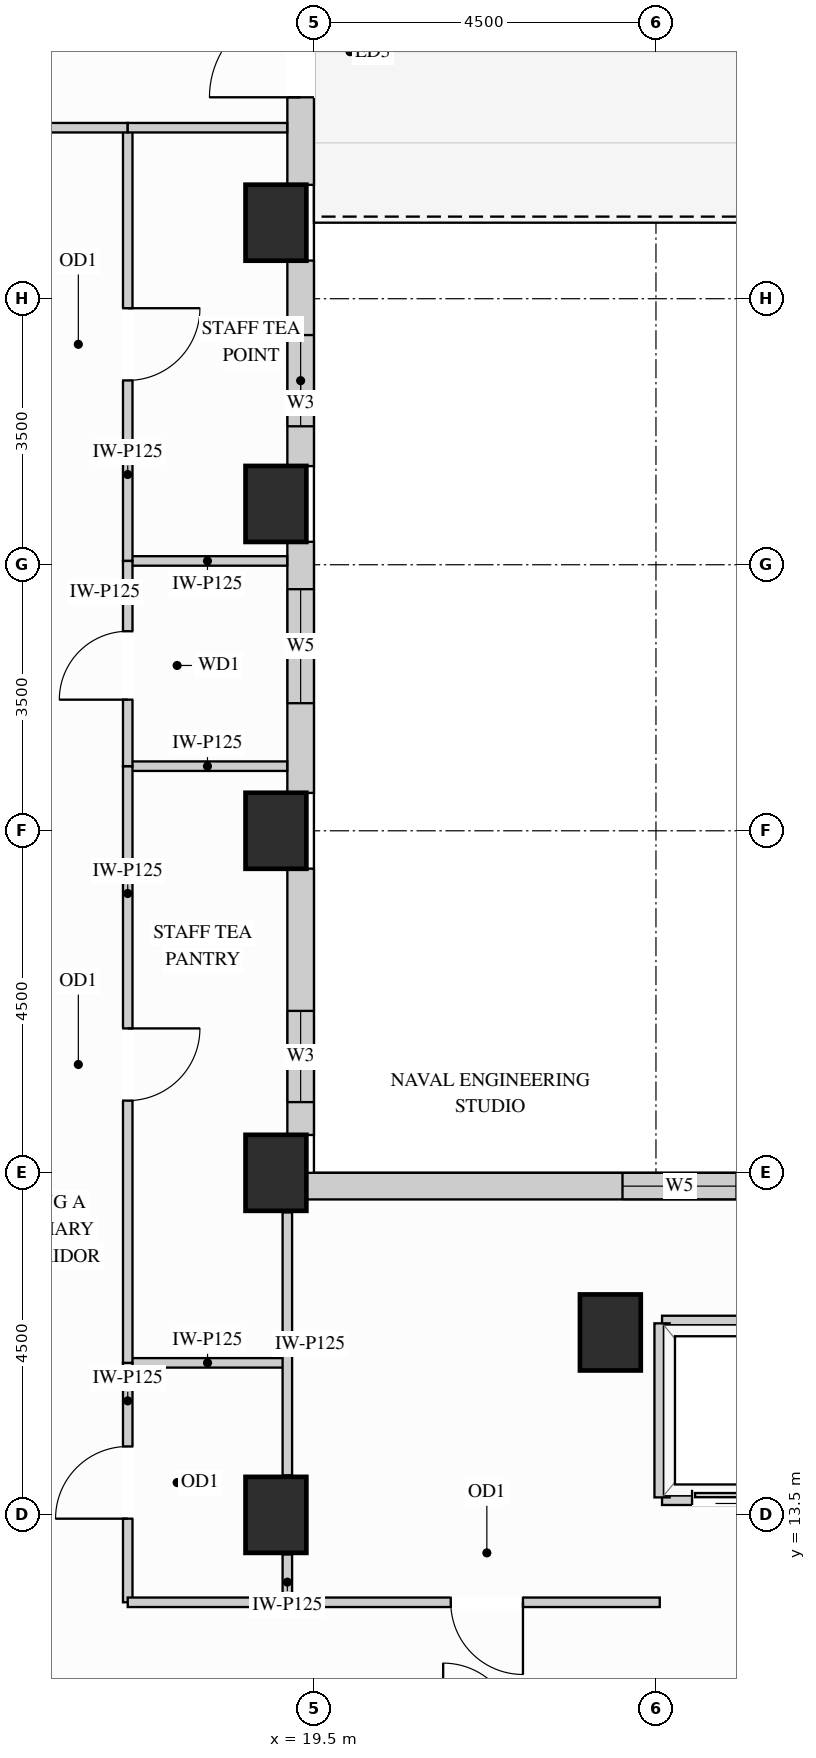
"""IFC4 building model, lengths in metres.
Left out: names, types, materials, properties, quantities, classifications, styles, units other than length and angle.
Written with IfcOpenShell. Run it as: python <this file> out.ifc"""

import sys

from ifc_helpers import new_model, si_unit, direction, frame, frame_2d, origin, origin_2d, place, context, subcontext, project, spatial, rectangle, extrude, source, transform, mapped, element, fill, save


model = new_model("IFC4")
c1 = context("Model", 3, precision=1e-05, world=origin(), true_north=direction((0.0, 1.0)))
c2 = subcontext(c1, "Body", "Model", "MODEL_VIEW")
j1 = project(units=[si_unit("LENGTHUNIT", "METRE"), si_unit("PLANEANGLEUNIT", "RADIAN")], contexts=[c1])
p1 = place(None, origin())
s1 = spatial("IfcSite", under=j1, at=p1, CompositionType="ELEMENT")
p2 = place(p1, origin())
s2 = spatial("IfcBuilding", under=s1, at=p2, CompositionType="ELEMENT")
p3 = place(p2, frame((0.0, 0.0, 200.7)))
s3 = spatial("IfcBuildingStorey", under=s2, at=p3, CompositionType="ELEMENT", Elevation=200.7)
m1 = source(origin(), c2, "Body", "SweptSolid", [
    extrude(rectangle(XDim=0.8, YDim=1.0, at=origin_2d()), origin(), (0.0, 0.0, 1.0), 3.4),
])
for number, where, z_axis, x_axis in (
    (1, (19.0, 13.5, 0.0), (0.0, 0.0, 1.0), (1.0, 0.0, 0.0)),
    (2, (19.0, 18.0, 0.0), (0.0, 0.0, 1.0), (1.0, 0.0, 0.0)),
    (3, (19.0, 22.5, 0.0), (0.0, 0.0, 1.0), (1.0, 0.0, 0.0)),
    (4, (19.0, 26.8, 0.0), (0.0, 0.0, 1.0), (1.0, 0.0, 0.0)),
    (5, (19.0, 30.5, 0.0), (0.0, 0.0, 1.0), (1.0, 0.0, 0.0)),
    (6, (23.4, 15.9, 0.0), (0.0, 0.0, 1.0), (1.0, 0.0, 0.0)),
):
    element("IfcColumn", number, at=place(p3, frame(where, z_axis=z_axis, x_axis=x_axis)), inside=s3, PredefinedType="COLUMN", context=c2, shape_type="MappedRepresentation", body=[
        mapped(m1, transform((0.0, 0.0, 0.0), x_axis=(1.0, 0.0, 0.0), y_axis=(0.0, 1.0, 0.0), z_axis=(0.0, 0.0, 1.0))),
    ])
p4 = place(p3, frame((34.502, 17.825, 0.0), z_axis=(0.0, 0.0, 1.0), x_axis=(-1.0, 0.0, 0.0)))
e7 = element("IfcWall", 7, at=p4, inside=s3, PredefinedType="SOLIDWALL", context=c2, shape_type="SweptSolid", body=[
    extrude(rectangle(XDim=15.104, YDim=0.35, at=frame_2d((7.552, 0.0))), origin(), (0.0, 0.0, 1.0), 3.385),
])
p5 = place(p4, frame((4.131, 0.0, 0.78)))
e8 = element("IfcOpeningElement", 8, at=p5, cuts=e7, PredefinedType="OPENING", context=c2, shape_type="SweptSolid", body=[
    extrude(rectangle(XDim=1.5, YDim=2.0, at=frame_2d((0.75, 1.0))), frame((0.0, 0.185, 0.0), z_axis=(0.0, -1.0, 0.0), x_axis=(1.0, 0.0, 0.0)), (0.0, 0.0, 1.0), 0.37),
])
p6 = place(p4, frame((9.442, 0.0, 0.78)))
e9 = element("IfcOpeningElement", 9, at=p6, cuts=e7, PredefinedType="OPENING", context=c2, shape_type="SweptSolid", body=[
    extrude(rectangle(XDim=1.5, YDim=2.0, at=frame_2d((0.75, 1.0))), frame((0.0, 0.185, 0.0), z_axis=(0.0, -1.0, 0.0), x_axis=(1.0, 0.0, 0.0)), (0.0, 0.0, 1.0), 0.37),
])
p7 = place(p3, frame((19.325, 18.498, 0.0), z_axis=(0.0, 0.0, 1.0), x_axis=(0.0, 1.0, 0.0)))
e10 = element("IfcWall", 10, at=p7, inside=s3, PredefinedType="SOLIDWALL", context=c2, shape_type="SweptSolid", body=[
    extrude(rectangle(XDim=3.504, YDim=0.35, at=frame_2d((1.752, 0.0))), origin(), (0.0, 0.0, 1.0), 2.612),
])
p8 = place(p7, frame((0.433, 0.0, 0.78)))
e11 = element("IfcOpeningElement", 11, at=p8, cuts=e10, PredefinedType="OPENING", context=c2, shape_type="SweptSolid", body=[
    extrude(rectangle(XDim=1.2, YDim=1.652, at=frame_2d((0.6, 0.826))), frame((0.0, 0.185, 0.0), z_axis=(0.0, -1.0, 0.0), x_axis=(1.0, 0.0, 0.0)), (0.0, 0.0, 1.0), 0.37),
])
p9 = place(p3, frame((19.325, 22.998, 0.0), z_axis=(0.0, 0.0, 1.0), x_axis=(0.0, 1.0, 0.0)))
e12 = element("IfcWall", 12, at=p9, inside=s3, PredefinedType="SOLIDWALL", context=c2, shape_type="SweptSolid", body=[
    extrude(rectangle(XDim=3.304, YDim=0.35, at=frame_2d((1.652, 0.0))), origin(), (0.0, 0.0, 1.0), 2.612),
])
p10 = place(p9, frame((1.18, 0.0, 0.78)))
e13 = element("IfcOpeningElement", 13, at=p10, cuts=e12, PredefinedType="OPENING", context=c2, shape_type="SweptSolid", body=[
    extrude(rectangle(XDim=1.5, YDim=1.652, at=frame_2d((0.75, 0.826))), frame((0.0, 0.185, 0.0), z_axis=(0.0, -1.0, 0.0), x_axis=(1.0, 0.0, 0.0)), (0.0, 0.0, 1.0), 0.37),
])
p11 = place(p3, frame((19.325, 27.298, 0.0), z_axis=(0.0, 0.0, 1.0), x_axis=(0.0, 1.0, 0.0)))
e14 = element("IfcWall", 14, at=p11, inside=s3, PredefinedType="SOLIDWALL", context=c2, shape_type="SweptSolid", body=[
    extrude(rectangle(XDim=2.704, YDim=0.35, at=frame_2d((1.352, 0.0))), origin(), (0.0, 0.0, 1.0), 2.612),
])
p12 = place(p11, frame((0.524, 0.0, 0.78)))
e15 = element("IfcOpeningElement", 15, at=p12, cuts=e14, PredefinedType="OPENING", context=c2, shape_type="SweptSolid", body=[
    extrude(rectangle(XDim=1.2, YDim=1.652, at=frame_2d((0.6, 0.826))), frame((0.0, 0.185, 0.0), z_axis=(0.0, -1.0, 0.0), x_axis=(1.0, 0.0, 0.0)), (0.0, 0.0, 1.0), 0.37),
])
p13 = place(p3, frame((19.325, 30.998, 0.0), z_axis=(0.0, 0.0, 1.0), x_axis=(0.0, 1.0, 0.0)))
e16 = element("IfcWall", 16, at=p13, inside=s3, PredefinedType="SOLIDWALL", context=c2, shape_type="SweptSolid", body=[
    extrude(rectangle(XDim=3.504, YDim=0.35, at=frame_2d((1.752, 0.0))), origin(), (0.0, 0.0, 1.0), 2.612),
])
p14 = place(p13, frame((1.152, 0.0, 0.0)))
e17 = element("IfcOpeningElement", 17, at=p14, cuts=e16, PredefinedType="OPENING", context=c2, shape_type="SweptSolid", body=[
    extrude(rectangle(XDim=1.2, YDim=2.15, at=frame_2d((0.6, 1.075))), frame((0.0, 0.185, 0.0), z_axis=(0.0, -1.0, 0.0), x_axis=(1.0, 0.0, 0.0)), (0.0, 0.0, 1.0), 0.37),
])
m2 = source(origin(), c2, "Body", "SweptSolid", [
    extrude(rectangle(XDim=2.1, YDim=0.125, at=frame_2d((1.05, 0.0))), origin(), (0.0, 0.0, 1.0), 3.385),
])
p15 = place(p3, frame((17.05, 15.5, 0.0), z_axis=(0.0, 0.0, 1.0), x_axis=(1.0, 0.0, 0.0)))
e18 = element("IfcWall", 18, at=p15, inside=s3, PredefinedType="PARTITIONING", context=c2, shape_type="MappedRepresentation", body=[
    mapped(m2, transform((0.0, 0.0, 0.0), x_axis=(1.0, 0.0, 0.0), y_axis=(0.0, 1.0, 0.0), z_axis=(0.0, 0.0, 1.0))),
])
m3 = source(origin(), c2, "Body", "SweptSolid", [
    extrude(rectangle(XDim=2.098, YDim=0.125, at=frame_2d((1.049, 0.0))), origin(), (0.0, 0.0, 1.0), 3.385),
])
for number, where, z_axis, x_axis in (
    (19, (17.05, 23.35, 0.0), (0.0, 0.0, 1.0), (1.0, 0.0, 0.0)),
    (20, (17.05, 26.05, 0.0), (0.0, 0.0, 1.0), (1.0, 0.0, 0.0)),
):
    element("IfcWall", number, at=place(p3, frame(where, z_axis=z_axis, x_axis=x_axis)), inside=s3, PredefinedType="PARTITIONING", context=c2, shape_type="MappedRepresentation", body=[
        mapped(m3, transform((0.0, 0.0, 0.0), x_axis=(1.0, 0.0, 0.0), y_axis=(0.0, 1.0, 0.0), z_axis=(0.0, 0.0, 1.0))),
    ])
m4 = source(origin(), c2, "Body", "SweptSolid", [
    extrude(rectangle(XDim=0.63, YDim=0.125, at=frame_2d((0.315, 0.0))), origin(), (0.0, 0.0, 1.0), 2.773),
])
p16 = place(p3, frame((19.15, 12.35, 0.0), z_axis=(0.0, 0.0, 1.0), x_axis=(0.0, 1.0, 0.0)))
e21 = element("IfcWall", 21, at=p16, inside=s3, PredefinedType="PARTITIONING", context=c2, shape_type="MappedRepresentation", body=[
    mapped(m4, transform((0.0, 0.0, 0.0), x_axis=(1.0, 0.0, 0.0), y_axis=(0.0, 1.0, 0.0), z_axis=(0.0, 0.0, 1.0))),
])
m5 = source(origin(), c2, "Body", "SweptSolid", [
    extrude(rectangle(XDim=3.46, YDim=0.125, at=frame_2d((1.73, 0.0))), origin(), (0.0, 0.0, 1.0), 2.773),
])
p17 = place(p3, frame((19.15, 14.02, 0.0), z_axis=(0.0, 0.0, 1.0), x_axis=(0.0, 1.0, 0.0)))
e22 = element("IfcWall", 22, at=p17, inside=s3, PredefinedType="PARTITIONING", context=c2, shape_type="MappedRepresentation", body=[
    mapped(m5, transform((0.0, 0.0, 0.0), x_axis=(1.0, 0.0, 0.0), y_axis=(0.0, 1.0, 0.0), z_axis=(0.0, 0.0, 1.0))),
])
p18 = place(p3, frame((17.05, 12.35, 0.0), z_axis=(0.0, 0.0, 1.0), x_axis=(0.0, 1.0, 0.0)))
e23 = element("IfcWall", 23, at=p18, inside=s3, PredefinedType="PARTITIONING", context=c2, shape_type="SweptSolid", body=[
    extrude(rectangle(XDim=3.15, YDim=0.125, at=frame_2d((1.575, 0.0))), origin(), (0.0, 0.0, 1.0), 3.385),
])
p19 = place(p18, frame((1.1, 0.0, 0.0)))
e24 = element("IfcOpeningElement", 24, at=p19, cuts=e23, PredefinedType="OPENING", context=c2, shape_type="SweptSolid", body=[
    extrude(rectangle(XDim=0.95, YDim=2.15, at=frame_2d((0.475, 1.075))), frame((0.0, 0.073, 0.0), z_axis=(0.0, -1.0, 0.0), x_axis=(1.0, 0.0, 0.0)), (0.0, 0.0, 1.0), 0.145),
])
p20 = place(p3, frame((17.05, 15.5, 0.0), z_axis=(0.0, 0.0, 1.0), x_axis=(0.0, 1.0, 0.0)))
e25 = element("IfcWall", 25, at=p20, inside=s3, PredefinedType="PARTITIONING", context=c2, shape_type="SweptSolid", body=[
    extrude(rectangle(XDim=7.85, YDim=0.125, at=frame_2d((3.925, 0.0))), origin(), (0.0, 0.0, 1.0), 3.385),
])
p21 = place(p20, frame((3.45, 0.0, 0.0)))
e26 = element("IfcOpeningElement", 26, at=p21, cuts=e25, PredefinedType="OPENING", context=c2, shape_type="SweptSolid", body=[
    extrude(rectangle(XDim=0.95, YDim=2.15, at=frame_2d((0.475, 1.075))), frame((0.0, 0.073, 0.0), z_axis=(0.0, -1.0, 0.0), x_axis=(1.0, 0.0, 0.0)), (0.0, 0.0, 1.0), 0.145),
])
p22 = place(p3, frame((17.05, 26.05, 0.0), z_axis=(0.0, 0.0, 1.0), x_axis=(0.0, 1.0, 0.0)))
e27 = element("IfcWall", 27, at=p22, inside=s3, PredefinedType="PARTITIONING", context=c2, shape_type="SweptSolid", body=[
    extrude(rectangle(XDim=5.7, YDim=0.125, at=frame_2d((2.85, 0.0))), origin(), (0.0, 0.0, 1.0), 3.385),
])
p23 = place(p22, frame((2.375, 0.0, 0.0)))
e28 = element("IfcOpeningElement", 28, at=p23, cuts=e27, PredefinedType="OPENING", context=c2, shape_type="SweptSolid", body=[
    extrude(rectangle(XDim=0.95, YDim=2.15, at=frame_2d((0.475, 1.075))), frame((0.0, 0.073, 0.0), z_axis=(0.0, -1.0, 0.0), x_axis=(1.0, 0.0, 0.0)), (0.0, 0.0, 1.0), 0.145),
])
p24 = place(p3, frame((17.05, 23.35, 0.0), z_axis=(0.0, 0.0, 1.0), x_axis=(0.0, 1.0, 0.0)))
e29 = element("IfcWall", 29, at=p24, inside=s3, PredefinedType="PARTITIONING", context=c2, shape_type="SweptSolid", body=[
    extrude(rectangle(XDim=2.7, YDim=0.125, at=frame_2d((1.35, 0.0))), origin(), (0.0, 0.0, 1.0), 3.385),
])
p25 = place(p24, frame((0.875, 0.0, 0.0)))
e30 = element("IfcOpeningElement", 30, at=p25, cuts=e29, PredefinedType="OPENING", context=c2, shape_type="SweptSolid", body=[
    extrude(rectangle(XDim=0.9, YDim=2.15, at=frame_2d((0.45, 1.075))), frame((0.0, 0.073, 0.0), z_axis=(0.0, -1.0, 0.0), x_axis=(1.0, 0.0, 0.0)), (0.0, 0.0, 1.0), 0.145),
])
p26 = place(p3, frame((11.916, 31.75, 0.0), z_axis=(0.0, 0.0, 1.0), x_axis=(1.0, 0.0, 0.0)))
e31 = element("IfcWall", 31, at=p26, inside=s3, PredefinedType="PARTITIONING", context=c2, shape_type="SweptSolid", body=[
    extrude(rectangle(XDim=5.134, YDim=0.125, at=frame_2d((2.567, 0.0))), origin(), (0.0, 0.0, 1.0), 2.848),
])
p27 = place(p26, frame((2.092, 0.0, 0.0)))
e32 = element("IfcOpeningElement", 32, at=p27, cuts=e31, PredefinedType="OPENING", context=c2, shape_type="SweptSolid", body=[
    extrude(rectangle(XDim=0.95, YDim=2.15, at=frame_2d((0.475, 1.075))), frame((0.0, 0.073, 0.0), z_axis=(0.0, -1.0, 0.0), x_axis=(1.0, 0.0, 0.0)), (0.0, 0.0, 1.0), 0.145),
])
m6 = source(origin(), c2, "Body", "SweptSolid", [
    extrude(rectangle(XDim=2.098, YDim=0.125, at=frame_2d((1.049, 0.0))), origin(), (0.0, 0.0, 1.0), 2.848),
])
p28 = place(p3, frame((17.05, 31.75, 0.0), z_axis=(0.0, 0.0, 1.0), x_axis=(1.0, 0.0, 0.0)))
e33 = element("IfcWall", 33, at=p28, inside=s3, PredefinedType="PARTITIONING", context=c2, shape_type="MappedRepresentation", body=[
    mapped(m6, transform((0.0, 0.0, 0.0), x_axis=(1.0, 0.0, 0.0), y_axis=(0.0, 1.0, 0.0), z_axis=(0.0, 0.0, 1.0))),
])
m7 = source(origin(), c2, "Body", "SweptSolid", [
    extrude(rectangle(XDim=2.45, YDim=0.125, at=frame_2d((1.225, 0.0))), origin(), (0.0, 0.0, 1.0), 3.385),
])
p29 = place(p3, frame((17.05, 12.35, 0.0), z_axis=(0.0, 0.0, 1.0), x_axis=(1.0, 0.0, 0.0)))
e34 = element("IfcWall", 34, at=p29, inside=s3, PredefinedType="PARTITIONING", context=c2, shape_type="MappedRepresentation", body=[
    mapped(m7, transform((0.0, 0.0, 0.0), x_axis=(1.0, 0.0, 0.0), y_axis=(0.0, 1.0, 0.0), z_axis=(0.0, 0.0, 1.0))),
])
p30 = place(p3, frame((19.5, 12.35, 0.0), z_axis=(0.0, 0.0, 1.0), x_axis=(1.0, 0.0, 0.0)))
e35 = element("IfcWall", 35, at=p30, inside=s3, PredefinedType="PARTITIONING", context=c2, shape_type="SweptSolid", body=[
    extrude(rectangle(XDim=4.55, YDim=0.125, at=frame_2d((2.275, 0.0))), origin(), (0.0, 0.0, 1.0), 3.385),
])
p31 = place(p30, frame((1.8, 0.0, 0.0)))
e36 = element("IfcOpeningElement", 36, at=p31, cuts=e35, PredefinedType="OPENING", context=c2, shape_type="SweptSolid", body=[
    extrude(rectangle(XDim=0.95, YDim=2.15, at=frame_2d((0.475, 1.075))), frame((0.0, 0.073, 0.0), z_axis=(0.0, -1.0, 0.0), x_axis=(1.0, 0.0, 0.0)), (0.0, 0.0, 1.0), 0.145),
])
m8 = source(origin(), c2, "Body", "SweptSolid", [
    extrude(rectangle(XDim=1.89, YDim=0.2, at=frame_2d((0.945, 0.0))), origin(), (0.0, 0.0, 1.0), 2.773),
])
p32 = place(p3, frame((24.08, 16.02, 0.0), z_axis=(0.0, 0.0, 1.0), x_axis=(1.0, 0.0, 0.0)))
e37 = element("IfcWall", 37, at=p32, inside=s3, PredefinedType="PARTITIONING", context=c2, shape_type="MappedRepresentation", body=[
    mapped(m8, transform((0.0, 0.0, 0.0), x_axis=(1.0, 0.0, 0.0), y_axis=(0.0, 1.0, 0.0), z_axis=(0.0, 0.0, 1.0))),
])
p33 = place(p3, frame((24.08, 13.73, 0.0), z_axis=(0.0, 0.0, 1.0), x_axis=(1.0, 0.0, 0.0)))
e38 = element("IfcWall", 38, at=p33, inside=s3, PredefinedType="PARTITIONING", context=c2, shape_type="SweptSolid", body=[
    extrude(rectangle(XDim=1.89, YDim=0.2, at=frame_2d((0.945, 0.0))), origin(), (0.0, 0.0, 1.0), 2.466),
])
p34 = place(p33, frame((0.395, 0.0, 0.0)))
e39 = element("IfcOpeningElement", 39, at=p34, cuts=e38, PredefinedType="OPENING", context=c2, shape_type="SweptSolid", body=[
    extrude(rectangle(XDim=1.1, YDim=2.2, at=frame_2d((0.55, 1.1))), frame((0.0, 0.11, 0.0), z_axis=(0.0, -1.0, 0.0), x_axis=(1.0, 0.0, 0.0)), (0.0, 0.0, 1.0), 0.22),
])
m9 = source(origin(), c2, "Body", "SweptSolid", [
    extrude(rectangle(XDim=2.29, YDim=0.2, at=frame_2d((1.145, 0.0))), origin(), (0.0, 0.0, 1.0), 3.385),
])
p35 = place(p3, frame((24.08, 13.73, 0.0), z_axis=(0.0, 0.0, 1.0), x_axis=(0.0, 1.0, 0.0)))
e40 = element("IfcWall", 40, at=p35, inside=s3, PredefinedType="PARTITIONING", context=c2, shape_type="MappedRepresentation", body=[
    mapped(m9, transform((0.0, 0.0, 0.0), x_axis=(1.0, 0.0, 0.0), y_axis=(0.0, 1.0, 0.0), z_axis=(0.0, 0.0, 1.0))),
])
m10 = source(origin(), c2, "Body", "SweptSolid", [
    extrude(rectangle(XDim=1.2, YDim=2.15, at=frame_2d((0.6, 1.075))), frame((0.0, 0.025, 0.0), z_axis=(0.0, -1.0, 0.0), x_axis=(1.0, 0.0, 0.0)), (0.0, 0.0, 1.0), 0.05),
])
p36 = place(p14, frame((1.2, 0.0, 0.0), z_axis=(0.0, 0.0, 1.0), x_axis=(-1.0, 0.0, 0.0)))
e41 = element("IfcDoor", 41, at=p36, inside=s3, OperationType="SINGLE_SWING_LEFT", PredefinedType="DOOR", context=c2, shape_type="MappedRepresentation", body=[
    mapped(m10, transform((0.0, 0.0, 0.0), x_axis=(1.0, 0.0, 0.0), y_axis=(0.0, 1.0, 0.0), z_axis=(0.0, 0.0, 1.0))),
])
fill(e17, e41)
m11 = source(origin(), c2, "Body", "SweptSolid", [
    extrude(rectangle(XDim=1.1, YDim=2.2, at=frame_2d((0.55, 1.1))), frame((0.0, 0.025, 0.0), z_axis=(0.0, -1.0, 0.0), x_axis=(1.0, 0.0, 0.0)), (0.0, 0.0, 1.0), 0.05),
])
p37 = place(p34, origin())
e42 = element("IfcDoor", 42, at=p37, inside=s3, OperationType="SLIDING_TO_LEFT", PredefinedType="DOOR", context=c2, shape_type="MappedRepresentation", body=[
    mapped(m11, transform((0.0, 0.0, 0.0), x_axis=(1.0, 0.0, 0.0), y_axis=(0.0, 1.0, 0.0), z_axis=(0.0, 0.0, 1.0))),
])
fill(e39, e42)
m12 = source(origin(), c2, "Body", "SweptSolid", [
    extrude(rectangle(XDim=0.95, YDim=2.15, at=frame_2d((0.475, 1.075))), frame((0.0, 0.025, 0.0), z_axis=(0.0, -1.0, 0.0), x_axis=(1.0, 0.0, 0.0)), (0.0, 0.0, 1.0), 0.05),
])
p38 = place(p19, origin())
e43 = element("IfcDoor", 43, at=p38, inside=s3, OperationType="SINGLE_SWING_LEFT", PredefinedType="DOOR", context=c2, shape_type="MappedRepresentation", body=[
    mapped(m12, transform((0.0, 0.0, 0.0), x_axis=(1.0, 0.0, 0.0), y_axis=(0.0, 1.0, 0.0), z_axis=(0.0, 0.0, 1.0))),
])
fill(e24, e43)
p39 = place(p21, origin())
e44 = element("IfcDoor", 44, at=p39, inside=s3, OperationType="SINGLE_SWING_RIGHT", PredefinedType="DOOR", context=c2, shape_type="MappedRepresentation", body=[
    mapped(m12, transform((0.0, 0.0, 0.0), x_axis=(1.0, 0.0, 0.0), y_axis=(0.0, 1.0, 0.0), z_axis=(0.0, 0.0, 1.0))),
])
fill(e26, e44)
p40 = place(p23, origin())
e45 = element("IfcDoor", 45, at=p40, inside=s3, OperationType="SINGLE_SWING_RIGHT", PredefinedType="DOOR", context=c2, shape_type="MappedRepresentation", body=[
    mapped(m12, transform((0.0, 0.0, 0.0), x_axis=(1.0, 0.0, 0.0), y_axis=(0.0, 1.0, 0.0), z_axis=(0.0, 0.0, 1.0))),
])
fill(e28, e45)
p41 = place(p31, origin())
e46 = element("IfcDoor", 46, at=p41, inside=s3, OperationType="SINGLE_SWING_RIGHT", PredefinedType="DOOR", context=c2, shape_type="MappedRepresentation", body=[
    mapped(m12, transform((0.0, 0.0, 0.0), x_axis=(1.0, 0.0, 0.0), y_axis=(0.0, 1.0, 0.0), z_axis=(0.0, 0.0, 1.0))),
])
fill(e36, e46)
m13 = source(origin(), c2, "Body", "SweptSolid", [
    extrude(rectangle(XDim=0.9, YDim=2.15, at=frame_2d((0.45, 1.075))), frame((0.0, 0.025, 0.0), z_axis=(0.0, -1.0, 0.0), x_axis=(1.0, 0.0, 0.0)), (0.0, 0.0, 1.0), 0.05),
])
p42 = place(p25, origin())
e47 = element("IfcDoor", 47, at=p42, inside=s3, OperationType="SINGLE_SWING_LEFT", PredefinedType="DOOR", context=c2, shape_type="MappedRepresentation", body=[
    mapped(m13, transform((0.0, 0.0, 0.0), x_axis=(1.0, 0.0, 0.0), y_axis=(0.0, 1.0, 0.0), z_axis=(0.0, 0.0, 1.0))),
])
fill(e30, e47)
m14 = source(origin(), c2, "Body", "SweptSolid", [
    extrude(rectangle(XDim=1.2, YDim=1.652, at=frame_2d((0.6, 0.826))), frame((0.0, 0.03, 0.0), z_axis=(0.0, -1.0, 0.0), x_axis=(1.0, 0.0, 0.0)), (0.0, 0.0, 1.0), 0.06),
])
p43 = place(p8, origin())
e48 = element("IfcWindow", 48, at=p43, inside=s3, PartitioningType="SINGLE_PANEL", PredefinedType="WINDOW", context=c2, shape_type="MappedRepresentation", body=[
    mapped(m14, transform((0.0, 0.0, 0.0), x_axis=(1.0, 0.0, 0.0), y_axis=(0.0, 1.0, 0.0), z_axis=(0.0, 0.0, 1.0))),
])
fill(e11, e48)
p44 = place(p12, origin())
e49 = element("IfcWindow", 49, at=p44, inside=s3, PartitioningType="SINGLE_PANEL", PredefinedType="WINDOW", context=c2, shape_type="MappedRepresentation", body=[
    mapped(m14, transform((0.0, 0.0, 0.0), x_axis=(1.0, 0.0, 0.0), y_axis=(0.0, 1.0, 0.0), z_axis=(0.0, 0.0, 1.0))),
])
fill(e15, e49)
m15 = source(origin(), c2, "Body", "SweptSolid", [
    extrude(rectangle(XDim=1.5, YDim=2.0, at=frame_2d((0.75, 1.0))), frame((0.0, 0.03, 0.0), z_axis=(0.0, -1.0, 0.0), x_axis=(1.0, 0.0, 0.0)), (0.0, 0.0, 1.0), 0.06),
])
p45 = place(p6, origin())
e50 = element("IfcWindow", 50, at=p45, inside=s3, PartitioningType="SINGLE_PANEL", PredefinedType="WINDOW", context=c2, shape_type="MappedRepresentation", body=[
    mapped(m15, transform((0.0, 0.0, 0.0), x_axis=(1.0, 0.0, 0.0), y_axis=(0.0, 1.0, 0.0), z_axis=(0.0, 0.0, 1.0))),
])
fill(e9, e50)
m16 = source(origin(), c2, "Body", "SweptSolid", [
    extrude(rectangle(XDim=1.5, YDim=1.652, at=frame_2d((0.75, 0.826))), frame((0.0, 0.03, 0.0), z_axis=(0.0, -1.0, 0.0), x_axis=(1.0, 0.0, 0.0)), (0.0, 0.0, 1.0), 0.06),
])
p46 = place(p10, origin())
e51 = element("IfcWindow", 51, at=p46, inside=s3, PartitioningType="SINGLE_PANEL", PredefinedType="WINDOW", context=c2, shape_type="MappedRepresentation", body=[
    mapped(m16, transform((0.0, 0.0, 0.0), x_axis=(1.0, 0.0, 0.0), y_axis=(0.0, 1.0, 0.0), z_axis=(0.0, 0.0, 1.0))),
])
fill(e13, e51)
save(model, sys.argv[1])
